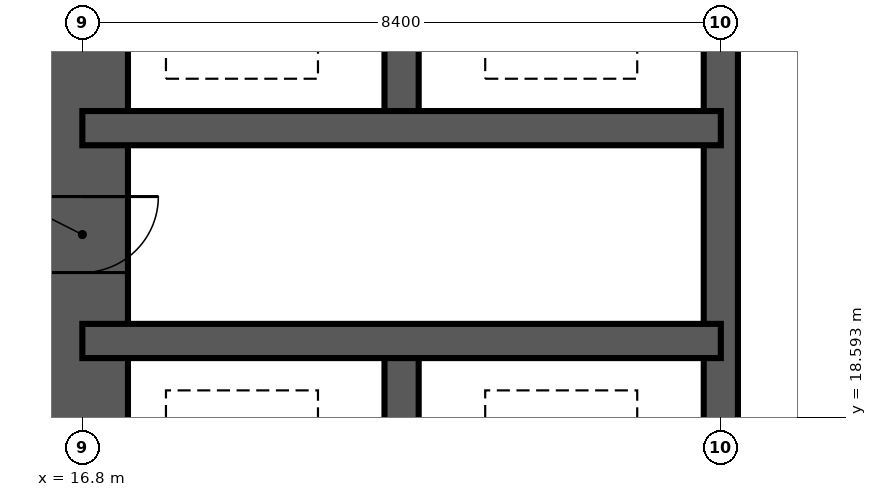
"""IFC4 building model, lengths in metres.
Left out: names, types, materials, properties, quantities, classifications, styles, units other than length and angle.
Written with IfcOpenShell. Run it as: python <this file> out.ifc"""

import sys

from ifc_helpers import new_model, si_unit, direction, frame, frame_2d, origin, place, context, subcontext, project, spatial, rectangle, extrude, element, fill, save


model = new_model("IFC4")
c1 = context("Model", 3, precision=1e-05, world=origin(), true_north=direction((0.0, 1.0)))
c2 = subcontext(c1, "Body", "Model", "MODEL_VIEW")
j1 = project(units=[si_unit("LENGTHUNIT", "METRE"), si_unit("PLANEANGLEUNIT", "RADIAN")], contexts=[c1])
p1 = place(None, origin())
s1 = spatial("IfcSite", under=j1, at=p1, CompositionType="ELEMENT")
p2 = place(p1, origin())
s2 = spatial("IfcBuilding", under=s1, at=p2, CompositionType="ELEMENT")
p3 = place(p2, frame((0.0, 0.0, 97.2)))
s3 = spatial("IfcBuildingStorey", under=s2, at=p3, CompositionType="ELEMENT", Elevation=97.2)
p4 = place(p3, frame((16.8, 41.4, -0.35), z_axis=(0.0, 0.0, 1.0), x_axis=(0.0, -1.0, 0.0)))
e1 = element("IfcWall", 1, at=p4, inside=s3, PredefinedType="SHEAR", context=c2, shape_type="SweptSolid", body=[
    extrude(rectangle(XDim=24.0, YDim=1.2, at=frame_2d((12.0, 0.0))), origin(), (0.0, 0.0, 1.0), 3.6),
])
p5 = place(p4, frame((11.1, 0.0, 0.35)))
e2 = element("IfcOpeningElement", 2, at=p5, cuts=e1, PredefinedType="OPENING", context=c2, shape_type="SweptSolid", body=[
    extrude(rectangle(XDim=1.8, YDim=2.2, at=frame_2d((0.9, 1.1))), frame((0.0, 0.61, 0.0), z_axis=(0.0, -1.0, 0.0), x_axis=(1.0, 0.0, 0.0)), (0.0, 0.0, 1.0), 1.22),
])
p6 = place(p4, frame((19.9, 0.0, 0.35)))
e3 = element("IfcOpeningElement", 3, at=p6, cuts=e1, PredefinedType="OPENING", context=c2, shape_type="SweptSolid", body=[
    extrude(rectangle(XDim=1.0, YDim=2.1, at=frame_2d((0.5, 1.05))), frame((0.0, 0.61, 0.0), z_axis=(0.0, -1.0, 0.0), x_axis=(1.0, 0.0, 0.0)), (0.0, 0.0, 1.0), 1.22),
])
p7 = place(p4, frame((5.2, 0.0, 0.35)))
e4 = element("IfcOpeningElement", 4, at=p7, cuts=e1, PredefinedType="OPENING", context=c2, shape_type="SweptSolid", body=[
    extrude(rectangle(XDim=1.0, YDim=2.1, at=frame_2d((0.5, 1.05))), frame((0.0, 0.61, 0.0), z_axis=(0.0, -1.0, 0.0), x_axis=(1.0, 0.0, 0.0)), (0.0, 0.0, 1.0), 1.22),
])
p8 = place(p3, frame((21.0, 16.8, -0.35), z_axis=(0.0, 0.0, 1.0), x_axis=(0.0, 1.0, 0.0)))
e5 = element("IfcWall", 5, at=p8, inside=s3, PredefinedType="SHEAR", context=c2, shape_type="SweptSolid", body=[
    extrude(rectangle(XDim=2.8, YDim=0.45, at=frame_2d((1.4, 0.0))), origin(), (0.0, 0.0, 1.0), 3.6),
])
p9 = place(p3, frame((21.0, 22.4, -0.35), z_axis=(0.0, 0.0, 1.0), x_axis=(0.0, 1.0, 0.0)))
e6 = element("IfcWall", 6, at=p9, inside=s3, PredefinedType="SHEAR", context=c2, shape_type="SweptSolid", body=[
    extrude(rectangle(XDim=5.6, YDim=0.45, at=frame_2d((2.8, 0.0))), origin(), (0.0, 0.0, 1.0), 3.6),
])
p10 = place(p3, frame((25.2, 16.8, -0.35), z_axis=(0.0, 0.0, 1.0), x_axis=(0.0, 1.0, 0.0)))
e7 = element("IfcWall", 7, at=p10, inside=s3, PredefinedType="SHEAR", context=c2, shape_type="SweptSolid", body=[
    extrude(rectangle(XDim=25.2, YDim=0.45, at=frame_2d((12.6, 0.0))), origin(), (0.0, 0.0, 1.0), 3.6),
])
p11 = place(p10, frame((12.1, 0.0, 0.35)))
e8 = element("IfcOpeningElement", 8, at=p11, cuts=e7, PredefinedType="OPENING", context=c2, shape_type="SweptSolid", body=[
    extrude(rectangle(XDim=1.0, YDim=2.1, at=frame_2d((0.5, 1.05))), frame((0.0, 0.235, 0.0), z_axis=(0.0, -1.0, 0.0), x_axis=(1.0, 0.0, 0.0)), (0.0, 0.0, 1.0), 0.47),
])
for number, where, z_axis, x_axis in (
    (9, (16.8, 19.6, -0.35), (0.0, 0.0, 1.0), (1.0, 0.0, 0.0)),
    (10, (16.8, 22.4, -0.35), (0.0, 0.0, 1.0), (1.0, 0.0, 0.0)),
):
    element("IfcWall", number, at=place(p3, frame(where, z_axis=z_axis, x_axis=x_axis)), inside=s3, PredefinedType="SHEAR", context=c2, shape_type="SweptSolid", body=[
        extrude(rectangle(XDim=8.4, YDim=0.45, at=frame_2d((4.2, 0.0))), origin(), (0.0, 0.0, 1.0), 3.6),
    ])
p12 = place(p6, origin())
e11 = element("IfcDoor", 11, at=p12, inside=s3, OperationType="SINGLE_SWING_LEFT", PredefinedType="DOOR", context=c2, shape_type="SweptSolid", body=[
    extrude(rectangle(XDim=1.0, YDim=2.1, at=frame_2d((0.5, 1.05))), frame((0.0, 0.025, 0.0), z_axis=(0.0, -1.0, 0.0), x_axis=(1.0, 0.0, 0.0)), (0.0, 0.0, 1.0), 0.05),
])
fill(e3, e11)
save(model, sys.argv[1])
